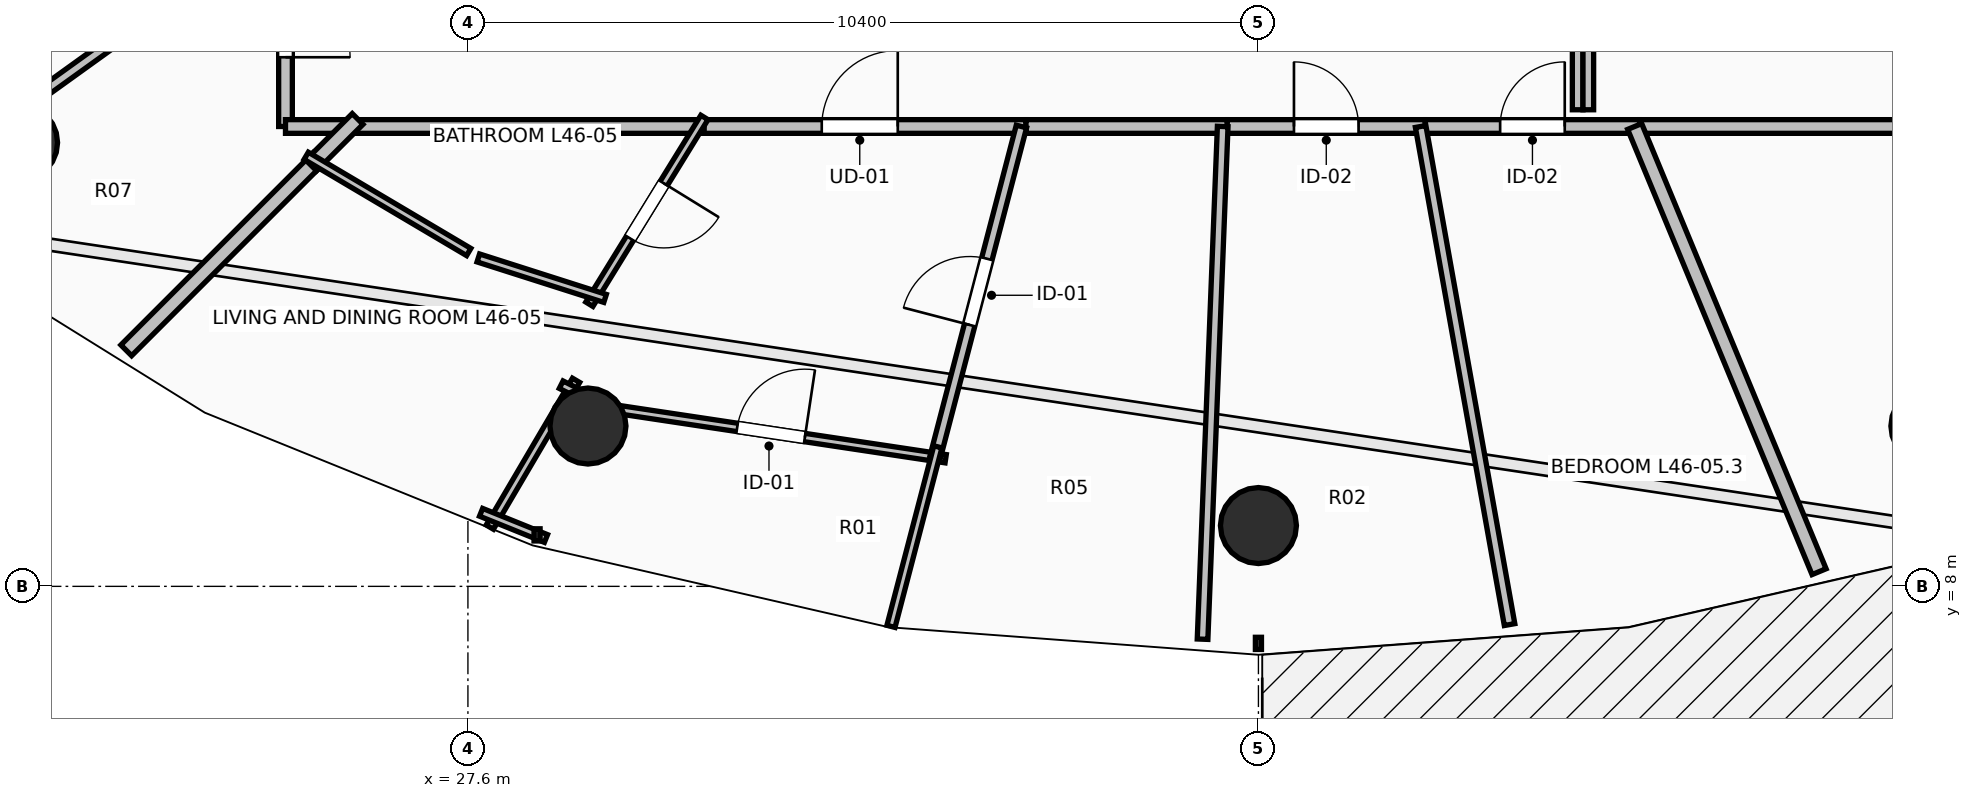
"""IFC4 building model, lengths in metres.
Left out: names, types, materials, properties, quantities, classifications, styles, units other than length and angle.
Written with IfcOpenShell. Run it as: python <this file> out.ifc"""

import sys

from ifc_helpers import new_model, si_unit, direction, frame, frame_2d, origin, origin_2d, place, context, subcontext, project, spatial, rectangle, circle, extrude, element, fill, save


model = new_model("IFC4")
c1 = context("Model", 3, precision=1e-05, world=origin(), true_north=direction((0.0, 1.0)))
c2 = subcontext(c1, "Body", "Model", "MODEL_VIEW")
j1 = project(units=[si_unit("LENGTHUNIT", "METRE"), si_unit("PLANEANGLEUNIT", "RADIAN")], contexts=[c1])
p1 = place(None, origin())
s1 = spatial("IfcSite", under=j1, at=p1, CompositionType="ELEMENT")
p2 = place(p1, origin())
s2 = spatial("IfcBuilding", under=s1, at=p2, CompositionType="ELEMENT")
p3 = place(p2, frame((0.0, 0.0, 171.1)))
s3 = spatial("IfcBuildingStorey", under=s2, at=p3, CompositionType="ELEMENT", Elevation=171.1)
for number, where, z_axis, x_axis in (
    (1, (21.701, 13.838, 0.0), (0.0, 0.0, 1.0), (-0.707, -0.707, 0.0)),
    (2, (29.179, 10.109, 0.0), (0.0, 0.0, 1.0), (-0.383, -0.924, 0.0)),
    (3, (38.0, 8.8, 0.0), (0.0, 0.0, 1.0), (0.0, -1.0, 0.0)),
    (4, (46.821, 10.109, 0.0), (0.0, 0.0, 1.0), (0.383, -0.924, 0.0)),
):
    element("IfcColumn", number, at=place(p3, frame(where, z_axis=z_axis, x_axis=x_axis)), inside=s3, PredefinedType="COLUMN", context=c2, shape_type="SweptSolid", body=[
        extrude(circle(Radius=0.5, at=origin_2d()), origin(), (0.0, 0.0, 1.0), 3.5),
    ])
p4 = place(p3, frame((25.2, 16.722, 0.0), z_axis=(0.0, 0.0, 1.0), x_axis=(0.0, -1.0, 0.0)))
e5 = element("IfcWall", 5, at=p4, inside=s3, PredefinedType="PARTITIONING", context=c2, shape_type="SweptSolid", body=[
    extrude(rectangle(XDim=2.672, YDim=0.18, at=frame_2d((1.336, 0.0))), origin(), (0.0, 0.0, 1.0), 2.392),
])
p5 = place(p4, frame((0.911, 0.0, 0.0)))
e6 = element("IfcOpeningElement", 6, at=p5, cuts=e5, PredefinedType="OPENING", context=c2, shape_type="SweptSolid", body=[
    extrude(rectangle(XDim=0.85, YDim=2.1, at=frame_2d((0.425, 1.05))), frame((0.0, 0.105, 0.0), z_axis=(0.0, -1.0, 0.0), x_axis=(1.0, 0.0, 0.0)), (0.0, 0.0, 1.0), 0.21),
])
p6 = place(p3, frame((25.2, 14.05, 0.0), z_axis=(0.0, 0.0, 1.0), x_axis=(1.0, 0.0, 0.0)))
e7 = element("IfcWall", 7, at=p6, inside=s3, PredefinedType="PARTITIONING", context=c2, shape_type="SweptSolid", body=[
    extrude(rectangle(XDim=0.91, YDim=0.18, at=frame_2d((0.455, 0.0))), origin(), (0.0, 0.0, 1.0), 2.889),
])
p7 = place(p3, frame((30.568, 14.05, 0.0), z_axis=(0.0, 0.0, 1.0), x_axis=(1.0, 0.0, 0.0)))
e8 = element("IfcWall", 8, at=p7, inside=s3, PredefinedType="PARTITIONING", context=c2, shape_type="SweptSolid", body=[
    extrude(rectangle(XDim=4.374, YDim=0.18, at=frame_2d((2.187, 0.0))), origin(), (0.0, 0.0, 1.0), 2.834),
])
p8 = place(p7, frame((1.687, 0.0, 0.0)))
e9 = element("IfcOpeningElement", 9, at=p8, cuts=e8, PredefinedType="OPENING", context=c2, shape_type="SweptSolid", body=[
    extrude(rectangle(XDim=1.0, YDim=2.15, at=frame_2d((0.5, 1.075))), frame((0.0, 0.105, 0.0), z_axis=(0.0, -1.0, 0.0), x_axis=(1.0, 0.0, 0.0)), (0.0, 0.0, 1.0), 0.21),
])
p9 = place(p3, frame((25.97, 14.05, 0.0), z_axis=(0.0, 0.0, 1.0), x_axis=(1.0, 0.0, 0.0)))
e10 = element("IfcWall", 10, at=p9, inside=s3, PredefinedType="PARTITIONING", context=c2, shape_type="SweptSolid", body=[
    extrude(rectangle(XDim=4.738, YDim=0.18, at=frame_2d((2.369, 0.0))), origin(), (0.0, 0.0, 1.0), 2.392),
])
p10 = place(p3, frame((34.942, 14.05, 0.0), z_axis=(0.0, 0.0, 1.0), x_axis=(1.0, 0.0, 0.0)))
e11 = element("IfcWall", 11, at=p10, inside=s3, PredefinedType="PARTITIONING", context=c2, shape_type="SweptSolid", body=[
    extrude(rectangle(XDim=2.648, YDim=0.18, at=frame_2d((1.324, 0.0))), origin(), (0.0, 0.0, 1.0), 2.834),
])
p11 = place(p3, frame((37.59, 14.05, 0.0), z_axis=(0.0, 0.0, 1.0), x_axis=(1.0, 0.0, 0.0)))
e12 = element("IfcWall", 12, at=p11, inside=s3, PredefinedType="PARTITIONING", context=c2, shape_type="SweptSolid", body=[
    extrude(rectangle(XDim=2.605, YDim=0.18, at=frame_2d((1.302, 0.0))), origin(), (0.0, 0.0, 1.0), 2.834),
])
p12 = place(p11, frame((0.877, 0.0, 0.0)))
e13 = element("IfcOpeningElement", 13, at=p12, cuts=e12, PredefinedType="OPENING", context=c2, shape_type="SweptSolid", body=[
    extrude(rectangle(XDim=0.85, YDim=2.1, at=frame_2d((0.425, 1.05))), frame((0.0, 0.105, 0.0), z_axis=(0.0, -1.0, 0.0), x_axis=(1.0, 0.0, 0.0)), (0.0, 0.0, 1.0), 0.21),
])
p13 = place(p3, frame((40.195, 14.05, 0.0), z_axis=(0.0, 0.0, 1.0), x_axis=(1.0, 0.0, 0.0)))
e14 = element("IfcWall", 14, at=p13, inside=s3, PredefinedType="PARTITIONING", context=c2, shape_type="SweptSolid", body=[
    extrude(rectangle(XDim=2.82, YDim=0.18, at=frame_2d((1.41, 0.0))), origin(), (0.0, 0.0, 1.0), 2.834),
])
p14 = place(p13, frame((0.985, 0.0, 0.0)))
e15 = element("IfcOpeningElement", 15, at=p14, cuts=e14, PredefinedType="OPENING", context=c2, shape_type="SweptSolid", body=[
    extrude(rectangle(XDim=0.85, YDim=2.1, at=frame_2d((0.425, 1.05))), frame((0.0, 0.105, 0.0), z_axis=(0.0, -1.0, 0.0), x_axis=(1.0, 0.0, 0.0)), (0.0, 0.0, 1.0), 0.21),
])
p15 = place(p3, frame((43.015, 14.05, 0.0), z_axis=(0.0, 0.0, 1.0), x_axis=(1.0, 0.0, 0.0)))
e16 = element("IfcWall", 16, at=p15, inside=s3, PredefinedType="PARTITIONING", context=c2, shape_type="SweptSolid", body=[
    extrude(rectangle(XDim=7.785, YDim=0.18, at=frame_2d((3.893, 0.0))), origin(), (0.0, 0.0, 1.0), 2.392),
])
p16 = place(p3, frame((20.069, 13.106, 0.0), z_axis=(0.0, 0.0, 1.0), x_axis=(0.81185514799, 0.58385890306, 0.0)))
e17 = element("IfcWall", 17, at=p16, inside=s3, PredefinedType="PARTITIONING", context=c2, shape_type="SweptSolid", body=[
    extrude(rectangle(XDim=6.32, YDim=0.14, at=frame_2d((3.16, 0.0))), origin(), (0.0, 0.0, 1.0), 2.392),
])
p17 = place(p3, frame((23.105, 11.105, 0.0), z_axis=(0.0, 0.0, 1.0), x_axis=(0.707106781187, 0.707106781187, 0.0)))
e18 = element("IfcWall", 18, at=p17, inside=s3, PredefinedType="PARTITIONING", context=c2, shape_type="SweptSolid", body=[
    extrude(rectangle(XDim=3.581, YDim=0.2, at=frame_2d((1.791, 0.0))), origin(), (0.0, 0.0, 1.0), 2.688),
])
p18 = place(p3, frame((25.538, 13.538, 0.0), z_axis=(0.0, 0.0, 1.0), x_axis=(0.707106781187, 0.707106781187, 0.0)))
e19 = element("IfcWall", 19, at=p18, inside=s3, PredefinedType="PARTITIONING", context=c2, shape_type="SweptSolid", body=[
    extrude(rectangle(XDim=0.864, YDim=0.2, at=frame_2d((0.432, 0.0))), origin(), (0.0, 0.0, 1.0), 2.889),
])
p19 = place(p3, frame((30.711, 14.169, 0.0), z_axis=(0.0, 0.0, 1.0), x_axis=(-0.524536274856, -0.851388099729, 0.0)))
e20 = element("IfcWall", 20, at=p19, inside=s3, PredefinedType="PARTITIONING", context=c2, shape_type="SweptSolid", body=[
    extrude(rectangle(XDim=2.886, YDim=0.11, at=frame_2d((1.443, 0.0))), origin(), (0.0, 0.0, 1.0), 2.834),
])
p20 = place(p19, frame((1.018, 0.0, 0.0)))
e21 = element("IfcOpeningElement", 21, at=p20, cuts=e20, PredefinedType="OPENING", context=c2, shape_type="SweptSolid", body=[
    extrude(rectangle(XDim=0.85, YDim=2.1, at=frame_2d((0.425, 1.05))), frame((0.0, 0.07, 0.0), z_axis=(0.0, -1.0, 0.0), x_axis=(1.0, 0.0, 0.0)), (0.0, 0.0, 1.0), 0.14),
])
p21 = place(p3, frame((29.404, 11.788, 0.0), z_axis=(0.0, 0.0, 1.0), x_axis=(-0.952663508426, 0.304026708881, 0.0)))
e22 = element("IfcWall", 22, at=p21, inside=s3, PredefinedType="PARTITIONING", context=c2, shape_type="SweptSolid", body=[
    extrude(rectangle(XDim=1.75, YDim=0.11, at=frame_2d((0.875, 0.0))), origin(), (0.0, 0.0, 1.0), 2.392),
])
p22 = place(p3, frame((27.611, 12.399, 0.0), z_axis=(0.0, 0.0, 1.0), x_axis=(-0.860546797705, 0.509371386082, 0.0)))
e23 = element("IfcWall", 23, at=p22, inside=s3, PredefinedType="PARTITIONING", context=c2, shape_type="SweptSolid", body=[
    extrude(rectangle(XDim=2.485, YDim=0.11, at=frame_2d((1.242, 0.0))), origin(), (0.0, 0.0, 1.0), 2.889),
])
p23 = place(p3, frame((27.888, 8.779, 0.0), z_axis=(0.0, 0.0, 1.0), x_axis=(0.506572342253, 0.86219746118, 0.0)))
e24 = element("IfcWall", 24, at=p23, inside=s3, PredefinedType="PARTITIONING", context=c2, shape_type="SweptSolid", body=[
    extrude(rectangle(XDim=2.24, YDim=0.11, at=frame_2d((1.12, 0.0))), origin(), (0.0, 0.0, 1.0), 2.392),
])
p24 = place(p3, frame((28.827, 10.653, 0.0), z_axis=(0.0, 0.0, 1.0), x_axis=(0.892195428052, -0.451649552378, 0.0)))
e25 = element("IfcWall", 25, at=p24, inside=s3, PredefinedType="PARTITIONING", context=c2, shape_type="SweptSolid", body=[
    extrude(rectangle(XDim=0.813, YDim=0.11, at=frame_2d((0.407, 0.0))), origin(), (0.0, 0.0, 1.0), 2.392),
])
p25 = place(p3, frame((29.29, 10.37, 0.0), z_axis=(0.0, 0.0, 1.0), x_axis=(0.988895858235, -0.148610166425, 0.0)))
e26 = element("IfcWall", 26, at=p25, inside=s3, PredefinedType="PARTITIONING", context=c2, shape_type="SweptSolid", body=[
    extrude(rectangle(XDim=4.647, YDim=0.11, at=frame_2d((2.324, 0.0))), origin(), (0.0, 0.0, 1.0), 3.2),
])
p26 = place(p25, frame((1.874, 0.0, 0.0)))
e27 = element("IfcOpeningElement", 27, at=p26, cuts=e26, PredefinedType="OPENING", context=c2, shape_type="SweptSolid", body=[
    extrude(rectangle(XDim=0.9, YDim=2.1, at=frame_2d((0.45, 1.05))), frame((0.0, 0.07, 0.0), z_axis=(0.0, -1.0, 0.0), x_axis=(1.0, 0.0, 0.0)), (0.0, 0.0, 1.0), 0.14),
])
p27 = place(p3, frame((27.773, 8.974, 0.0), z_axis=(0.0, 0.0, 1.0), x_axis=(0.927227668606, -0.374498131599, 0.0)))
e28 = element("IfcWall", 28, at=p27, inside=s3, PredefinedType="PARTITIONING", context=c2, shape_type="SweptSolid", body=[
    extrude(rectangle(XDim=0.92, YDim=0.11, at=frame_2d((0.46, 0.0))), origin(), (0.0, 0.0, 1.0), 3.2),
])
p28 = place(p3, frame((33.747, 9.7, 0.0), z_axis=(0.0, 0.0, 1.0), x_axis=(0.252463899176, 0.967606314372, 0.0)))
e29 = element("IfcWall", 29, at=p28, inside=s3, PredefinedType="PARTITIONING", context=c2, shape_type="SweptSolid", body=[
    extrude(rectangle(XDim=4.496, YDim=0.14, at=frame_2d((2.248, 0.0))), origin(), (0.0, 0.0, 1.0), 2.834),
])
p29 = place(p28, frame((1.798, 0.0, 0.0)))
e30 = element("IfcOpeningElement", 30, at=p29, cuts=e29, PredefinedType="OPENING", context=c2, shape_type="SweptSolid", body=[
    extrude(rectangle(XDim=0.9, YDim=2.1, at=frame_2d((0.45, 1.05))), frame((0.0, 0.085, 0.0), z_axis=(0.0, -1.0, 0.0), x_axis=(1.0, 0.0, 0.0)), (0.0, 0.0, 1.0), 0.17),
])
p30 = place(p3, frame((33.166, 7.473, 0.0), z_axis=(0.0, 0.0, 1.0), x_axis=(0.252710924929, 0.967541827737, 0.0)))
e31 = element("IfcWall", 31, at=p30, inside=s3, PredefinedType="PARTITIONING", context=c2, shape_type="SweptSolid", body=[
    extrude(rectangle(XDim=2.441, YDim=0.11, at=frame_2d((1.221, 0.0))), origin(), (0.0, 0.0, 1.0), 2.688),
])
p31 = place(p3, frame((37.265, 7.305, 0.0), z_axis=(0.0, 0.0, 1.0), x_axis=(0.039277615957, 0.99922833671, 0.0)))
e32 = element("IfcWall", 32, at=p31, inside=s3, PredefinedType="PARTITIONING", context=c2, shape_type="SweptSolid", body=[
    extrude(rectangle(XDim=6.75, YDim=0.14, at=frame_2d((3.375, 0.0))), origin(), (0.0, 0.0, 1.0), 2.688),
])
p32 = place(p3, frame((41.304, 7.497, 0.0), z_axis=(0.0, 0.0, 1.0), x_axis=(-0.175753825846, 0.984434148484, 0.0)))
e33 = element("IfcWall", 33, at=p32, inside=s3, PredefinedType="PARTITIONING", context=c2, shape_type="SweptSolid", body=[
    extrude(rectangle(XDim=6.656, YDim=0.14, at=frame_2d((3.328, 0.0))), origin(), (0.0, 0.0, 1.0), 2.392),
])
p33 = place(p3, frame((45.376, 8.193, 0.0), z_axis=(0.0, 0.0, 1.0), x_axis=(-0.382683979298, 0.923879305964, 0.0)))
e34 = element("IfcWall", 34, at=p33, inside=s3, PredefinedType="PARTITIONING", context=c2, shape_type="SweptSolid", body=[
    extrude(rectangle(XDim=6.34, YDim=0.2, at=frame_2d((3.17, 0.0))), origin(), (0.0, 0.0, 1.0), 2.392),
])
for number, where, z_axis, x_axis in (
    (35, (42.2, 16.1, 0.0), (0.0, 0.0, 1.0), (0.0, -1.0, 0.0)),
    (36, (42.34, 14.27, 0.0), (0.0, 0.0, 1.0), (0.0, 1.0, 0.0)),
):
    element("IfcWall", number, at=place(p3, frame(where, z_axis=z_axis, x_axis=x_axis)), inside=s3, PredefinedType="PARTITIONING", context=c2, shape_type="SweptSolid", body=[
        extrude(rectangle(XDim=1.83, YDim=0.14, at=frame_2d((0.915, 0.0))), origin(), (0.0, 0.0, 1.0), 3.2),
    ])
p34 = place(p8, origin())
e37 = element("IfcDoor", 37, at=p34, inside=s3, OperationType="SINGLE_SWING_RIGHT", PredefinedType="DOOR", context=c2, shape_type="SweptSolid", body=[
    extrude(rectangle(XDim=1.0, YDim=2.15, at=frame_2d((0.5, 1.075))), frame((0.0, 0.025, 0.0), z_axis=(0.0, -1.0, 0.0), x_axis=(1.0, 0.0, 0.0)), (0.0, 0.0, 1.0), 0.05),
])
fill(e9, e37)
p35 = place(p20, origin())
e38 = element("IfcDoor", 38, at=p35, inside=s3, OperationType="SINGLE_SWING_LEFT", PredefinedType="DOOR", context=c2, shape_type="SweptSolid", body=[
    extrude(rectangle(XDim=0.85, YDim=2.1, at=frame_2d((0.425, 1.05))), frame((0.0, 0.025, 0.0), z_axis=(0.0, -1.0, 0.0), x_axis=(1.0, 0.0, 0.0)), (0.0, 0.0, 1.0), 0.05),
])
fill(e21, e38)
p36 = place(p26, origin())
e39 = element("IfcDoor", 39, at=p36, inside=s3, OperationType="SINGLE_SWING_RIGHT", PredefinedType="DOOR", context=c2, shape_type="SweptSolid", body=[
    extrude(rectangle(XDim=0.9, YDim=2.1, at=frame_2d((0.45, 1.05))), frame((0.0, 0.025, 0.0), z_axis=(0.0, -1.0, 0.0), x_axis=(1.0, 0.0, 0.0)), (0.0, 0.0, 1.0), 0.05),
])
fill(e27, e39)
p37 = place(p29, origin())
e40 = element("IfcDoor", 40, at=p37, inside=s3, OperationType="SINGLE_SWING_LEFT", PredefinedType="DOOR", context=c2, shape_type="SweptSolid", body=[
    extrude(rectangle(XDim=0.9, YDim=2.1, at=frame_2d((0.45, 1.05))), frame((0.0, 0.025, 0.0), z_axis=(0.0, -1.0, 0.0), x_axis=(1.0, 0.0, 0.0)), (0.0, 0.0, 1.0), 0.05),
])
fill(e30, e40)
p38 = place(p5, origin())
e41 = element("IfcDoor", 41, at=p38, inside=s3, OperationType="SINGLE_SWING_RIGHT", PredefinedType="DOOR", context=c2, shape_type="SweptSolid", body=[
    extrude(rectangle(XDim=0.85, YDim=2.1, at=frame_2d((0.425, 1.05))), frame((0.0, 0.025, 0.0), z_axis=(0.0, -1.0, 0.0), x_axis=(1.0, 0.0, 0.0)), (0.0, 0.0, 1.0), 0.05),
])
fill(e6, e41)
p39 = place(p12, origin())
e42 = element("IfcDoor", 42, at=p39, inside=s3, OperationType="SINGLE_SWING_LEFT", PredefinedType="DOOR", context=c2, shape_type="SweptSolid", body=[
    extrude(rectangle(XDim=0.85, YDim=2.1, at=frame_2d((0.425, 1.05))), frame((0.0, 0.025, 0.0), z_axis=(0.0, -1.0, 0.0), x_axis=(1.0, 0.0, 0.0)), (0.0, 0.0, 1.0), 0.05),
])
fill(e13, e42)
p40 = place(p14, origin())
e43 = element("IfcDoor", 43, at=p40, inside=s3, OperationType="SINGLE_SWING_RIGHT", PredefinedType="DOOR", context=c2, shape_type="SweptSolid", body=[
    extrude(rectangle(XDim=0.85, YDim=2.1, at=frame_2d((0.425, 1.05))), frame((0.0, 0.025, 0.0), z_axis=(0.0, -1.0, 0.0), x_axis=(1.0, 0.0, 0.0)), (0.0, 0.0, 1.0), 0.05),
])
fill(e15, e43)
save(model, sys.argv[1])
